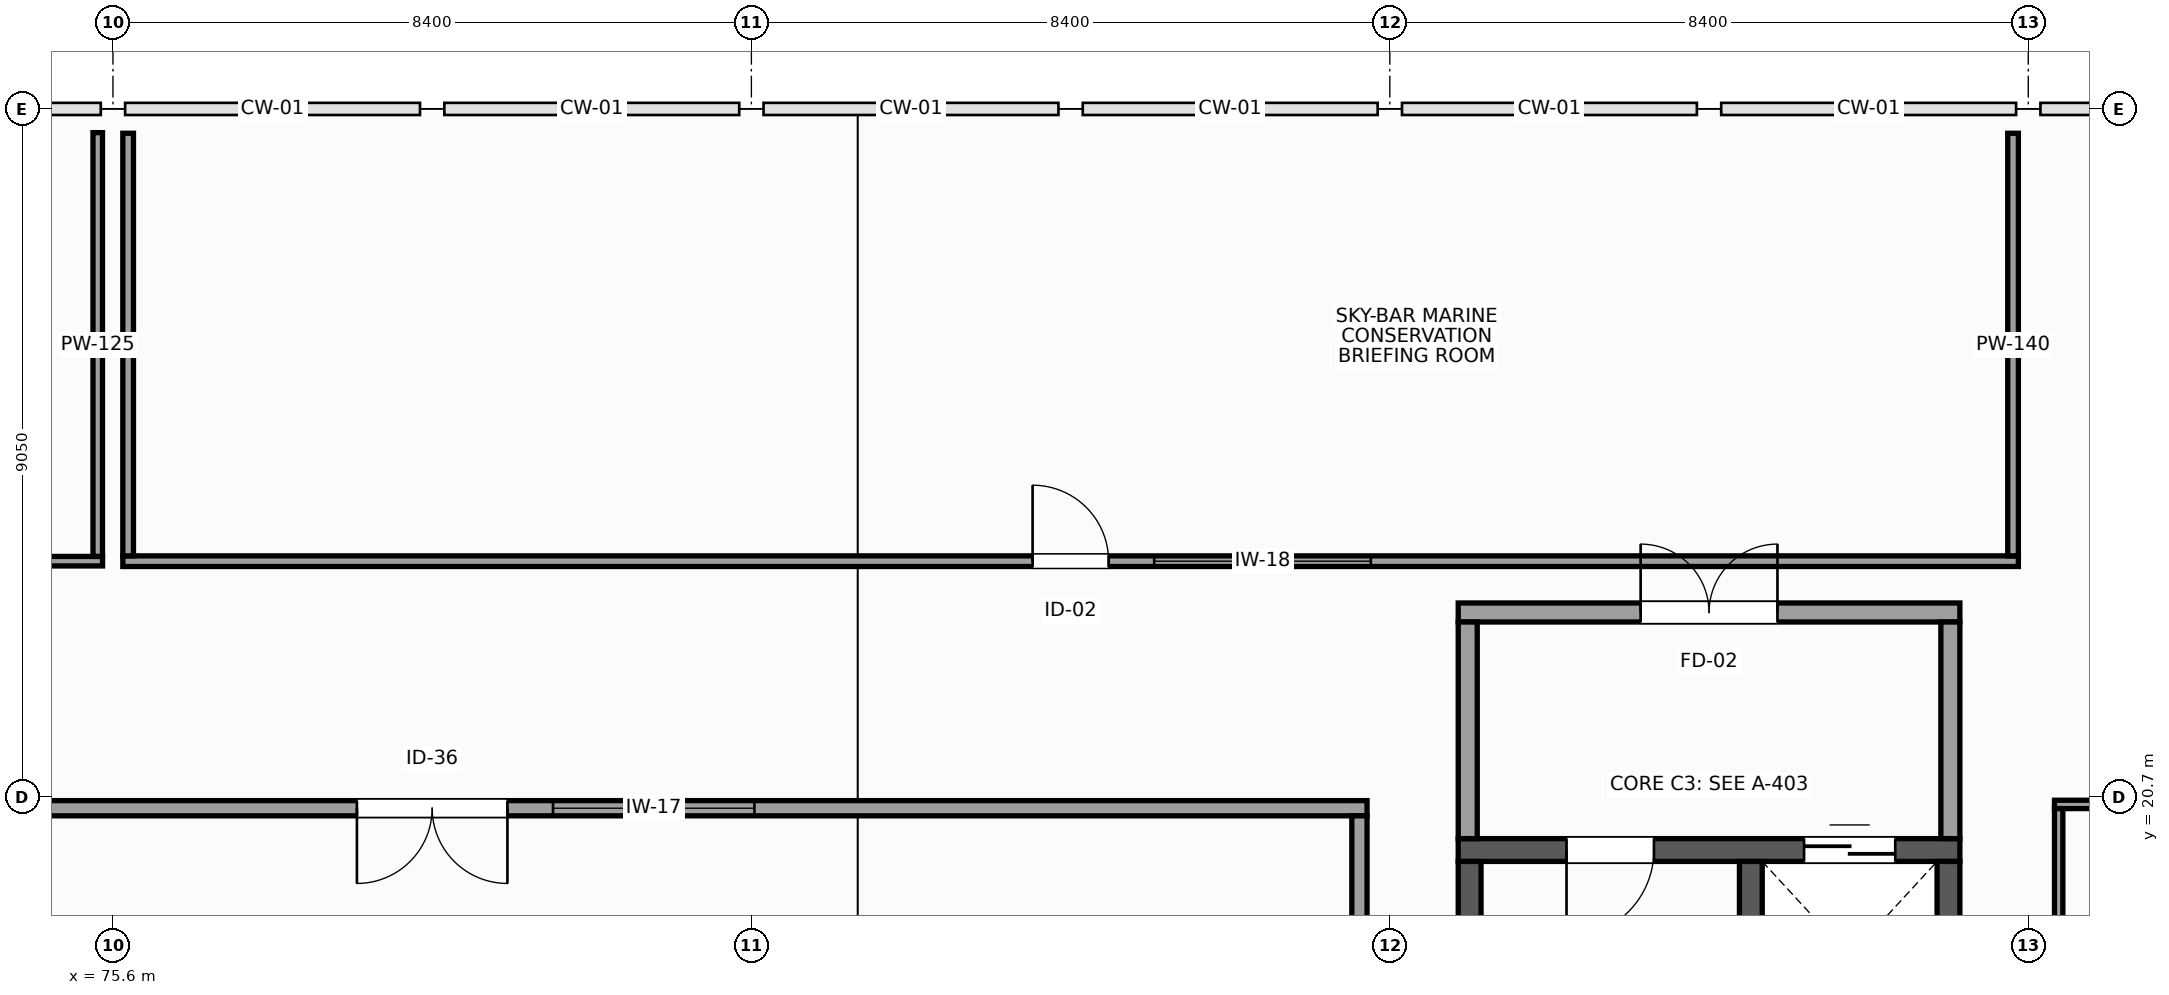
"""IFC4 building model, lengths in metres.
Left out: names, types, materials, properties, quantities, classifications, styles, units other than length and angle.
Written with IfcOpenShell. Run it as: python <this file> out.ifc"""

import sys

from ifc_helpers import new_model, si_unit, direction, frame, frame_2d, origin, origin_2d, place, context, subcontext, project, spatial, rectangle, extrude, element, fill, save


model = new_model("IFC4")
c1 = context("Model", 3, precision=1e-05, world=origin(), true_north=direction((0.0, 1.0)))
c2 = subcontext(c1, "Body", "Model", "MODEL_VIEW")
j1 = project(units=[si_unit("LENGTHUNIT", "METRE"), si_unit("PLANEANGLEUNIT", "RADIAN")], contexts=[c1])
p1 = place(None, origin())
s1 = spatial("IfcSite", under=j1, at=p1, CompositionType="ELEMENT")
p2 = place(p1, origin())
s2 = spatial("IfcBuilding", under=s1, at=p2, CompositionType="ELEMENT")
p3 = place(p2, frame((0.0, 0.0, 24.6)))
s3 = spatial("IfcBuildingStorey", under=s2, at=p3, CompositionType="ELEMENT", Elevation=24.6)
p4 = place(p3, frame((93.3, 20.0, 0.0), z_axis=(0.0, 0.0, 1.0), x_axis=(1.0, 0.0, 0.0)))
e1 = element("IfcWall", 1, at=p4, inside=s3, PredefinedType="SHEAR", context=c2, shape_type="SweptSolid", body=[
    extrude(rectangle(XDim=6.6, YDim=0.3, at=frame_2d((3.3, 0.0))), origin(), (0.0, 0.0, 1.0), 5.18),
])
p5 = place(p4, frame((1.425, 0.0, 0.0)))
e2 = element("IfcOpeningElement", 2, at=p5, cuts=e1, PredefinedType="OPENING", context=c2, shape_type="SweptSolid", body=[
    extrude(rectangle(XDim=1.15, YDim=2.2, at=frame_2d((0.575, 1.1))), frame((0.0, 0.16, 0.0), z_axis=(0.0, -1.0, 0.0), x_axis=(1.0, 0.0, 0.0)), (0.0, 0.0, 1.0), 0.32),
])
p6 = place(p4, frame((4.55, 0.0, 0.0)))
e3 = element("IfcOpeningElement", 3, at=p6, cuts=e1, PredefinedType="OPENING", context=c2, shape_type="SweptSolid", body=[
    extrude(rectangle(XDim=1.2, YDim=2.15, at=frame_2d((0.6, 1.075))), frame((0.0, 0.16, 0.0), z_axis=(0.0, -1.0, 0.0), x_axis=(1.0, 0.0, 0.0)), (0.0, 0.0, 1.0), 0.32),
])
for number, where, z_axis, x_axis in (
    (4, (93.45, 12.45, 0.0), (0.0, 0.0, 1.0), (0.0, 1.0, 0.0)),
    (5, (99.75, 12.45, 0.0), (0.0, 0.0, 1.0), (0.0, 1.0, 0.0)),
    (6, (97.15, 12.45, 0.0), (0.0, 0.0, 1.0), (0.0, 1.0, 0.0)),
):
    element("IfcWall", number, at=place(p3, frame(where, z_axis=z_axis, x_axis=x_axis)), inside=s3, PredefinedType="SHEAR", context=c2, shape_type="SweptSolid", body=[
        extrude(rectangle(XDim=7.4, YDim=0.3, at=frame_2d((3.7, 0.0))), origin(), (0.0, 0.0, 1.0), 5.18),
    ])
p7 = place(p3, frame((93.3, 23.125, 0.0), z_axis=(0.0, 0.0, 1.0), x_axis=(1.0, 0.0, 0.0)))
e7 = element("IfcWall", 7, at=p7, inside=s3, PredefinedType="PARTITIONING", context=c2, shape_type="SweptSolid", body=[
    extrude(rectangle(XDim=6.6, YDim=0.25, at=frame_2d((3.3, 0.0))), origin(), (0.0, 0.0, 1.0), 4.568),
])
p8 = place(p7, frame((2.4, 0.0, 0.0)))
e8 = element("IfcOpeningElement", 8, at=p8, cuts=e7, PredefinedType="OPENING", context=c2, shape_type="SweptSolid", body=[
    extrude(rectangle(XDim=1.8, YDim=2.25, at=frame_2d((0.9, 1.125))), frame((0.0, 0.135, 0.0), z_axis=(0.0, -1.0, 0.0), x_axis=(1.0, 0.0, 0.0)), (0.0, 0.0, 1.0), 0.27),
])
for number, where, z_axis, x_axis in (
    (9, (93.425, 20.15, 0.0), (0.0, 0.0, 1.0), (0.0, 1.0, 0.0)),
    (10, (99.775, 20.15, 0.0), (0.0, 0.0, 1.0), (0.0, 1.0, 0.0)),
):
    element("IfcWall", number, at=place(p3, frame(where, z_axis=z_axis, x_axis=x_axis)), inside=s3, PredefinedType="PARTITIONING", context=c2, shape_type="SweptSolid", body=[
        extrude(rectangle(XDim=2.85, YDim=0.25, at=frame_2d((1.425, 0.0))), origin(), (0.0, 0.0, 1.0), 4.94),
    ])
p9 = place(p3, frame((101.145, 20.6, 0.0), z_axis=(0.0, 0.0, 1.0), x_axis=(1.0, 0.0, 0.0)))
e11 = element("IfcWall", 11, at=p9, inside=s3, PredefinedType="PARTITIONING", context=c2, shape_type="SweptSolid", body=[
    extrude(rectangle(XDim=6.21, YDim=0.11, at=frame_2d((3.105, 0.0))), origin(), (0.0, 0.0, 1.0), 4.568),
])
p10 = place(p9, frame((0.595, 0.0, 0.0)))
e12 = element("IfcOpeningElement", 12, at=p10, cuts=e11, PredefinedType="OPENING", context=c2, shape_type="SweptSolid", body=[
    extrude(rectangle(XDim=0.92, YDim=2.1, at=frame_2d((0.46, 1.05))), frame((0.0, 0.065, 0.0), z_axis=(0.0, -1.0, 0.0), x_axis=(1.0, 0.0, 0.0)), (0.0, 0.0, 1.0), 0.13),
])
p11 = place(p9, frame((2.595, 0.0, 0.0)))
e13 = element("IfcOpeningElement", 13, at=p11, cuts=e11, PredefinedType="OPENING", context=c2, shape_type="SweptSolid", body=[
    extrude(rectangle(XDim=0.92, YDim=2.1, at=frame_2d((0.46, 1.05))), frame((0.0, 0.065, 0.0), z_axis=(0.0, -1.0, 0.0), x_axis=(1.0, 0.0, 0.0)), (0.0, 0.0, 1.0), 0.13),
])
p12 = place(p9, frame((4.605, 0.0, 0.0)))
e14 = element("IfcOpeningElement", 14, at=p12, cuts=e11, PredefinedType="OPENING", context=c2, shape_type="SweptSolid", body=[
    extrude(rectangle(XDim=1.0, YDim=2.15, at=frame_2d((0.5, 1.075))), frame((0.0, 0.065, 0.0), z_axis=(0.0, -1.0, 0.0), x_axis=(1.0, 0.0, 0.0)), (0.0, 0.0, 1.0), 0.13),
])
p13 = place(p3, frame((101.2, 15.855, 0.0), z_axis=(0.0, 0.0, 1.0), x_axis=(0.0, 1.0, 0.0)))
e15 = element("IfcWall", 15, at=p13, inside=s3, PredefinedType="PARTITIONING", context=c2, shape_type="SweptSolid", body=[
    extrude(rectangle(XDim=4.69, YDim=0.11, at=frame_2d((2.345, 0.0))), origin(), (0.0, 0.0, 1.0), 4.568),
])
p14 = place(p3, frame((33.938, 23.8, 0.0), z_axis=(0.0, 0.0, 1.0), x_axis=(1.0, 0.0, 0.0)))
e16 = element("IfcWall", 16, at=p14, inside=s3, PredefinedType="PARTITIONING", context=c2, shape_type="SweptSolid", body=[
    extrude(rectangle(XDim=41.525, YDim=0.125, at=frame_2d((20.762, 0.0))), origin(), (0.0, 0.0, 1.0), 4.568),
])
p15 = place(p14, frame((19.822, 0.0, 0.0)))
e17 = element("IfcOpeningElement", 17, at=p15, cuts=e16, PredefinedType="OPENING", context=c2, shape_type="SweptSolid", body=[
    extrude(rectangle(XDim=1.88, YDim=2.42, at=frame_2d((0.94, 1.21))), frame((0.0, 0.073, 0.0), z_axis=(0.0, -1.0, 0.0), x_axis=(1.0, 0.0, 0.0)), (0.0, 0.0, 1.0), 0.145),
])
p16 = place(p14, frame((22.302, 0.0, 1.05)))
e18 = element("IfcOpeningElement", 18, at=p16, cuts=e16, PredefinedType="OPENING", context=c2, shape_type="SweptSolid", body=[
    extrude(rectangle(XDim=2.35, YDim=1.48, at=frame_2d((1.175, 0.74))), frame((0.0, 0.073, 0.0), z_axis=(0.0, -1.0, 0.0), x_axis=(1.0, 0.0, 0.0)), (0.0, 0.0, 1.0), 0.145),
])
p17 = place(p3, frame((75.4, 23.863, 0.0), z_axis=(0.0, 0.0, 1.0), x_axis=(0.0, 1.0, 0.0)))
e19 = element("IfcWall", 19, at=p17, inside=s3, PredefinedType="PARTITIONING", context=c2, shape_type="SweptSolid", body=[
    extrude(rectangle(XDim=5.575, YDim=0.125, at=frame_2d((2.788, 0.0))), origin(), (0.0, 0.0, 1.0), 4.568),
])
p18 = place(p3, frame((67.5, 20.55, 0.0), z_axis=(0.0, 0.0, 1.0), x_axis=(1.0, 0.0, 0.0)))
e20 = element("IfcWall", 20, at=p18, inside=s3, PredefinedType="PARTITIONING", context=c2, shape_type="SweptSolid", body=[
    extrude(rectangle(XDim=24.6, YDim=0.2, at=frame_2d((12.3, 0.0))), origin(), (0.0, 0.0, 1.0), 4.568),
])
p19 = place(p18, frame((11.31, 0.0, 0.0)))
e21 = element("IfcOpeningElement", 21, at=p19, cuts=e20, PredefinedType="OPENING", context=c2, shape_type="SweptSolid", body=[
    extrude(rectangle(XDim=1.98, YDim=2.46, at=frame_2d((0.99, 1.23))), frame((0.0, 0.11, 0.0), z_axis=(0.0, -1.0, 0.0), x_axis=(1.0, 0.0, 0.0)), (0.0, 0.0, 1.0), 0.22),
])
p20 = place(p18, frame((13.89, 0.0, 1.05)))
e22 = element("IfcOpeningElement", 22, at=p20, cuts=e20, PredefinedType="OPENING", context=c2, shape_type="SweptSolid", body=[
    extrude(rectangle(XDim=2.65, YDim=1.28, at=frame_2d((1.325, 0.64))), frame((0.0, 0.11, 0.0), z_axis=(0.0, -1.0, 0.0), x_axis=(1.0, 0.0, 0.0)), (0.0, 0.0, 1.0), 0.22),
])
p21 = place(p3, frame((92.0, 12.0, 0.0), z_axis=(0.0, 0.0, 1.0), x_axis=(0.0, 1.0, 0.0)))
e23 = element("IfcWall", 23, at=p21, inside=s3, PredefinedType="PARTITIONING", context=c2, shape_type="SweptSolid", body=[
    extrude(rectangle(XDim=8.45, YDim=0.2, at=frame_2d((4.225, 0.0))), origin(), (0.0, 0.0, 1.0), 4.94),
])
p22 = place(p3, frame((75.73, 23.8, 0.0), z_axis=(0.0, 0.0, 1.0), x_axis=(1.0, 0.0, 0.0)))
e24 = element("IfcWall", 24, at=p22, inside=s3, PredefinedType="PARTITIONING", context=c2, shape_type="SweptSolid", body=[
    extrude(rectangle(XDim=24.94, YDim=0.14, at=frame_2d((12.47, 0.0))), origin(), (0.0, 0.0, 1.0), 4.568),
])
p23 = place(p22, frame((11.97, 0.0, 0.0)))
e25 = element("IfcOpeningElement", 25, at=p23, cuts=e24, PredefinedType="OPENING", context=c2, shape_type="SweptSolid", body=[
    extrude(rectangle(XDim=1.0, YDim=2.15, at=frame_2d((0.5, 1.075))), frame((0.0, 0.08, 0.0), z_axis=(0.0, -1.0, 0.0), x_axis=(1.0, 0.0, 0.0)), (0.0, 0.0, 1.0), 0.16),
])
p24 = place(p22, frame((13.57, 0.0, 1.05)))
e26 = element("IfcOpeningElement", 26, at=p24, cuts=e24, PredefinedType="OPENING", context=c2, shape_type="SweptSolid", body=[
    extrude(rectangle(XDim=2.85, YDim=1.52, at=frame_2d((1.425, 0.76))), frame((0.0, 0.08, 0.0), z_axis=(0.0, -1.0, 0.0), x_axis=(1.0, 0.0, 0.0)), (0.0, 0.0, 1.0), 0.16),
])
for number, where, z_axis, x_axis in (
    (27, (100.6, 23.87, 0.0), (0.0, 0.0, 1.0), (0.0, 1.0, 0.0)),
    (28, (75.8, 23.87, 0.0), (0.0, 0.0, 1.0), (0.0, 1.0, 0.0)),
):
    element("IfcWall", number, at=place(p3, frame(where, z_axis=z_axis, x_axis=x_axis)), inside=s3, PredefinedType="PARTITIONING", context=c2, shape_type="SweptSolid", body=[
        extrude(rectangle(XDim=5.56, YDim=0.14, at=frame_2d((2.78, 0.0))), origin(), (0.0, 0.0, 1.0), 4.568),
    ])
p25 = place(p2, frame((0.0, 0.0, 30.0)))
p26 = place(p25, frame((0.0, 0.0, -0.22)))
p27 = place(p26, frame((79.8, 25.2, -0.01), z_axis=(0.0, 0.0, 1.0), x_axis=(1.0, 0.0, 0.0)))
p28 = place(p27, frame((0.0, 0.0, 0.05)))
e29 = element("IfcWindow", 29, at=p28, inside=s3, PartitioningType="SINGLE_PANEL", PredefinedType="SKYLIGHT", context=c2, shape_type="SweptSolid", body=[
    extrude(rectangle(XDim=3.0, YDim=2.4, at=origin_2d()), origin(), (0.0, 0.0, 1.0), 0.18),
])
p29 = place(p25, frame((0.0, 0.0, -0.22)))
p30 = place(p29, frame((90.6, 24.8, -0.01), z_axis=(0.0, 0.0, 1.0), x_axis=(1.0, 0.0, 0.0)))
p31 = place(p30, frame((0.0, 0.0, 0.05)))
e30 = element("IfcWindow", 30, at=p31, inside=s3, PartitioningType="SINGLE_PANEL", PredefinedType="SKYLIGHT", context=c2, shape_type="SweptSolid", body=[
    extrude(rectangle(XDim=2.4, YDim=2.4, at=origin_2d()), origin(), (0.0, 0.0, 1.0), 0.18),
])
p32 = place(p29, frame((98.0, 25.2, -0.01), z_axis=(0.0, 0.0, 1.0), x_axis=(1.0, 0.0, 0.0)))
p33 = place(p32, frame((0.0, 0.0, 0.05)))
e31 = element("IfcWindow", 31, at=p33, inside=s3, PartitioningType="SINGLE_PANEL", PredefinedType="SKYLIGHT", context=c2, shape_type="SweptSolid", body=[
    extrude(rectangle(XDim=3.0, YDim=2.4, at=origin_2d()), origin(), (0.0, 0.0, 1.0), 0.18),
])
p34 = place(p5, frame((1.15, 0.0, 0.0), z_axis=(0.0, 0.0, 1.0), x_axis=(-1.0, 0.0, 0.0)))
e32 = element("IfcDoor", 32, at=p34, inside=s3, OperationType="SINGLE_SWING_RIGHT", PredefinedType="DOOR", context=c2, shape_type="SweptSolid", body=[
    extrude(rectangle(XDim=1.15, YDim=2.2, at=frame_2d((0.575, 1.1))), frame((0.0, 0.025, 0.0), z_axis=(0.0, -1.0, 0.0), x_axis=(1.0, 0.0, 0.0)), (0.0, 0.0, 1.0), 0.05),
])
fill(e2, e32)
p35 = place(p6, origin())
e33 = element("IfcDoor", 33, at=p35, inside=s3, OperationType="DOUBLE_DOOR_SLIDING", PredefinedType="DOOR", context=c2, shape_type="SweptSolid", body=[
    extrude(rectangle(XDim=1.2, YDim=2.15, at=frame_2d((0.6, 1.075))), frame((0.0, 0.025, 0.0), z_axis=(0.0, -1.0, 0.0), x_axis=(1.0, 0.0, 0.0)), (0.0, 0.0, 1.0), 0.05),
])
fill(e3, e33)
p36 = place(p8, origin())
e34 = element("IfcDoor", 34, at=p36, inside=s3, OperationType="DOUBLE_DOOR_SINGLE_SWING", PredefinedType="DOOR", context=c2, shape_type="SweptSolid", body=[
    extrude(rectangle(XDim=1.8, YDim=2.25, at=frame_2d((0.9, 1.125))), frame((0.0, 0.025, 0.0), z_axis=(0.0, -1.0, 0.0), x_axis=(1.0, 0.0, 0.0)), (0.0, 0.0, 1.0), 0.05),
])
fill(e8, e34)
p37 = place(p19, frame((1.98, 0.0, 0.0), z_axis=(0.0, 0.0, 1.0), x_axis=(-1.0, 0.0, 0.0)))
e35 = element("IfcDoor", 35, at=p37, inside=s3, OperationType="DOUBLE_DOOR_SINGLE_SWING", PredefinedType="DOOR", context=c2, shape_type="SweptSolid", body=[
    extrude(rectangle(XDim=1.98, YDim=2.46, at=frame_2d((0.99, 1.23))), frame((0.0, 0.025, 0.0), z_axis=(0.0, -1.0, 0.0), x_axis=(1.0, 0.0, 0.0)), (0.0, 0.0, 1.0), 0.05),
])
fill(e21, e35)
p38 = place(p20, origin())
e36 = element("IfcWindow", 36, at=p38, inside=s3, PartitioningType="SINGLE_PANEL", PredefinedType="WINDOW", context=c2, shape_type="SweptSolid", body=[
    extrude(rectangle(XDim=2.65, YDim=1.28, at=frame_2d((1.325, 0.64))), frame((0.0, 0.03, 0.0), z_axis=(0.0, -1.0, 0.0), x_axis=(1.0, 0.0, 0.0)), (0.0, 0.0, 1.0), 0.06),
])
fill(e22, e36)
p39 = place(p23, origin())
e37 = element("IfcDoor", 37, at=p39, inside=s3, OperationType="SINGLE_SWING_LEFT", PredefinedType="DOOR", context=c2, shape_type="SweptSolid", body=[
    extrude(rectangle(XDim=1.0, YDim=2.15, at=frame_2d((0.5, 1.075))), frame((0.0, 0.025, 0.0), z_axis=(0.0, -1.0, 0.0), x_axis=(1.0, 0.0, 0.0)), (0.0, 0.0, 1.0), 0.05),
])
fill(e25, e37)
p40 = place(p24, origin())
e38 = element("IfcWindow", 38, at=p40, inside=s3, PartitioningType="SINGLE_PANEL", PredefinedType="WINDOW", context=c2, shape_type="SweptSolid", body=[
    extrude(rectangle(XDim=2.85, YDim=1.52, at=frame_2d((1.425, 0.76))), frame((0.0, 0.03, 0.0), z_axis=(0.0, -1.0, 0.0), x_axis=(1.0, 0.0, 0.0)), (0.0, 0.0, 1.0), 0.06),
])
fill(e26, e38)
save(model, sys.argv[1])
